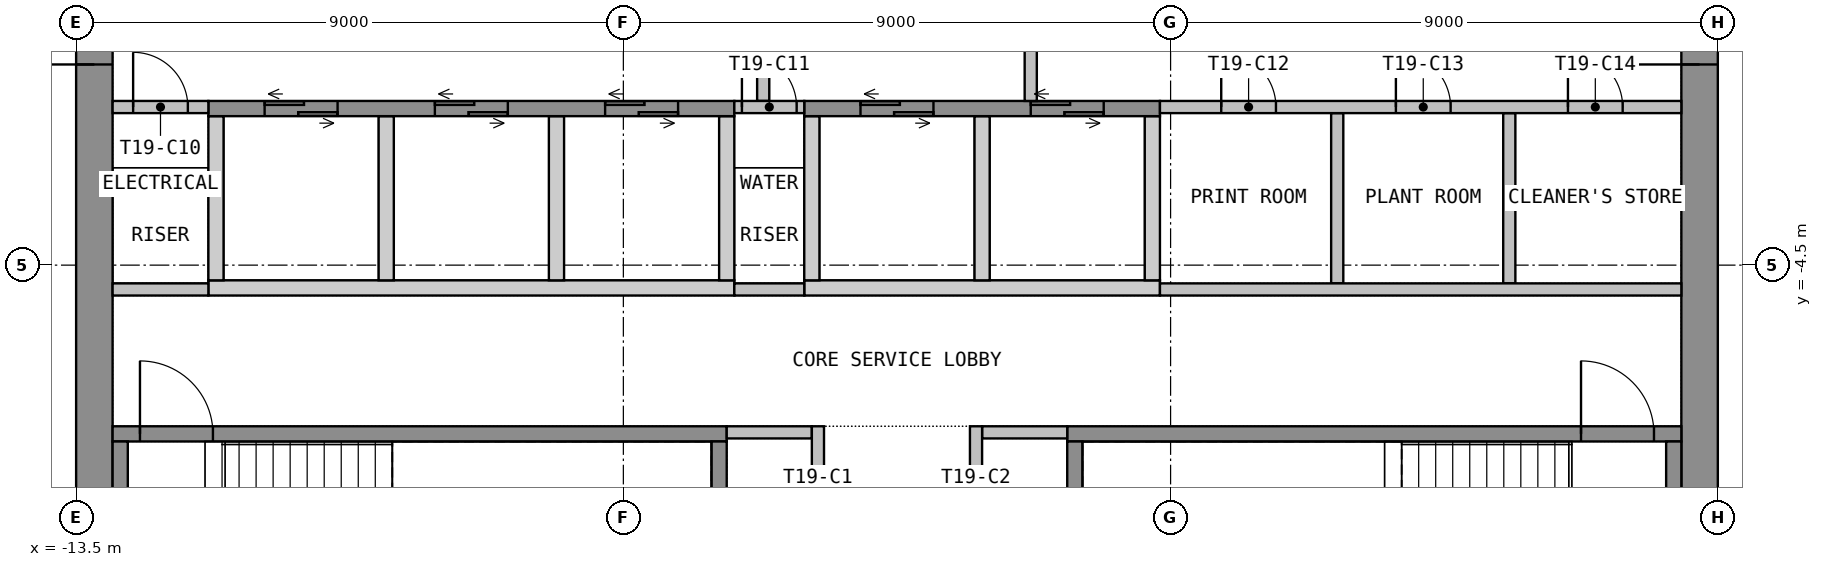
"""IFC4 building model, lengths in metres.
Left out: names, types, materials, properties, quantities, classifications, styles, units other than length and angle.
Written with IfcOpenShell. Run it as: python <this file> out.ifc"""

import sys

from ifc_helpers import new_model, si_unit, direction, frame, frame_2d, origin, place, context, subcontext, project, spatial, polyline, rectangle, outline, extrude, element, fill, save


model = new_model("IFC4")
c1 = context("Model", 3, precision=1e-05, world=origin(), true_north=direction((0.0, 1.0)))
c2 = subcontext(c1, "Body", "Model", "MODEL_VIEW")
j1 = project(units=[si_unit("LENGTHUNIT", "METRE"), si_unit("PLANEANGLEUNIT", "RADIAN")], contexts=[c1])
p1 = place(None, origin())
s1 = spatial("IfcSite", under=j1, at=p1, CompositionType="ELEMENT")
p2 = place(p1, origin())
s2 = spatial("IfcBuilding", under=s1, at=p2, CompositionType="ELEMENT")
p3 = place(p2, frame((0.0, 0.0, 258.6)))
s3 = spatial("IfcBuildingStorey", under=s2, at=p3, CompositionType="ELEMENT", Elevation=258.6)
p4 = place(p3, frame((-13.2, -10.65, 0.0), z_axis=(0.0, 0.0, 1.0), x_axis=(0.0, 1.0, 0.0)))
e1 = element("IfcWall", 1, at=p4, inside=s3, PredefinedType="SHEAR", context=c2, shape_type="SweptSolid", body=[
    extrude(rectangle(XDim=21.3, YDim=0.6, at=frame_2d((10.65, 0.0))), origin(), (0.0, 0.0, 1.0), 3.575),
])
p5 = place(p4, frame((9.45, 0.0, 0.0)))
e2 = element("IfcOpeningElement", 2, at=p5, cuts=e1, PredefinedType="OPENING", context=c2, shape_type="SweptSolid", body=[
    extrude(rectangle(XDim=2.4, YDim=2.1, at=frame_2d((1.2, 1.05))), frame((0.0, 0.31, 0.0), z_axis=(0.0, -1.0, 0.0), x_axis=(1.0, 0.0, 0.0)), (0.0, 0.0, 1.0), 0.62),
])
p6 = place(p3, frame((13.2, -10.65, 0.0), z_axis=(0.0, 0.0, 1.0), x_axis=(0.0, 1.0, 0.0)))
e3 = element("IfcWall", 3, at=p6, inside=s3, PredefinedType="SHEAR", context=c2, shape_type="SweptSolid", body=[
    extrude(rectangle(XDim=21.3, YDim=0.6, at=frame_2d((10.65, 0.0))), origin(), (0.0, 0.0, 1.0), 3.575),
])
p7 = place(p6, frame((9.45, 0.0, 0.0)))
e4 = element("IfcOpeningElement", 4, at=p7, cuts=e3, PredefinedType="OPENING", context=c2, shape_type="SweptSolid", body=[
    extrude(rectangle(XDim=2.4, YDim=2.1, at=frame_2d((1.2, 1.05))), frame((0.0, 0.31, 0.0), z_axis=(0.0, -1.0, 0.0), x_axis=(1.0, 0.0, 0.0)), (0.0, 0.0, 1.0), 0.62),
])
p8 = place(p3, origin())
e5 = element("IfcWall", 5, at=p8, inside=s3, PredefinedType="SHEAR", context=c2, shape_type="SweptSolid", body=[
    extrude(outline(polyline([(-11.325, -5.0), (-2.675, -5.0), (-2.675, -4.75), (-11.325, -4.75), (-11.325, -5.0)])), origin(), (0.0, 0.0, 1.0), 3.575),
])
p9 = place(p3, origin())
e6 = element("IfcWall", 6, at=p9, inside=s3, PredefinedType="SHEAR", context=c2, shape_type="SweptSolid", body=[
    extrude(outline(polyline([(-1.525, -5.0), (4.325, -5.0), (4.325, -4.75), (-1.525, -4.75), (-1.525, -5.0)])), origin(), (0.0, 0.0, 1.0), 3.575),
])
p10 = place(p3, origin())
e7 = element("IfcWall", 7, at=p10, inside=s3, PredefinedType="SHEAR", context=c2, shape_type="SweptSolid", body=[
    extrude(outline(polyline([(-11.325, -4.75), (-11.075, -4.75), (-11.075, -2.05), (-11.325, -2.05), (-11.325, -4.75)])), origin(), (0.0, 0.0, 1.0), 3.575),
])
p11 = place(p3, origin())
e8 = element("IfcWall", 8, at=p11, inside=s3, PredefinedType="SHEAR", context=c2, shape_type="SweptSolid", body=[
    extrude(outline(polyline([(-8.525, -4.75), (-8.275, -4.75), (-8.275, -2.05), (-8.525, -2.05), (-8.525, -4.75)])), origin(), (0.0, 0.0, 1.0), 3.575),
])
p12 = place(p3, origin())
e9 = element("IfcWall", 9, at=p12, inside=s3, PredefinedType="SHEAR", context=c2, shape_type="SweptSolid", body=[
    extrude(outline(polyline([(-5.725, -4.75), (-5.475, -4.75), (-5.475, -2.05), (-5.725, -2.05), (-5.725, -4.75)])), origin(), (0.0, 0.0, 1.0), 3.575),
])
p13 = place(p3, origin())
e10 = element("IfcWall", 10, at=p13, inside=s3, PredefinedType="SHEAR", context=c2, shape_type="SweptSolid", body=[
    extrude(outline(polyline([(-2.925, -4.75), (-2.675, -4.75), (-2.675, -2.05), (-2.925, -2.05), (-2.925, -4.75)])), origin(), (0.0, 0.0, 1.0), 3.575),
])
p14 = place(p3, origin())
e11 = element("IfcWall", 11, at=p14, inside=s3, PredefinedType="SHEAR", context=c2, shape_type="SweptSolid", body=[
    extrude(outline(polyline([(-1.525, -4.75), (-1.275, -4.75), (-1.275, -2.05), (-1.525, -2.05), (-1.525, -4.75)])), origin(), (0.0, 0.0, 1.0), 3.575),
])
p15 = place(p3, origin())
e12 = element("IfcWall", 12, at=p15, inside=s3, PredefinedType="SHEAR", context=c2, shape_type="SweptSolid", body=[
    extrude(outline(polyline([(1.275, -4.75), (1.525, -4.75), (1.525, -2.05), (1.275, -2.05), (1.275, -4.75)])), origin(), (0.0, 0.0, 1.0), 3.575),
])
p16 = place(p3, origin())
e13 = element("IfcWall", 13, at=p16, inside=s3, PredefinedType="SHEAR", context=c2, shape_type="SweptSolid", body=[
    extrude(outline(polyline([(4.075, -4.75), (4.325, -4.75), (4.325, -2.05), (4.075, -2.05), (4.075, -4.75)])), origin(), (0.0, 0.0, 1.0), 3.575),
])
p17 = place(p3, frame((-11.325, -1.925, 0.0), z_axis=(0.0, 0.0, 1.0), x_axis=(1.0, 0.0, 0.0)))
e14 = element("IfcWall", 14, at=p17, inside=s3, PredefinedType="SHEAR", context=c2, shape_type="SweptSolid", body=[
    extrude(rectangle(XDim=8.65, YDim=0.25, at=frame_2d((4.325, 0.0))), origin(), (0.0, 0.0, 1.0), 3.575),
])
p18 = place(p17, frame((0.925, 0.0, 0.0)))
e15 = element("IfcOpeningElement", 15, at=p18, cuts=e14, PredefinedType="OPENING", context=c2, shape_type="SweptSolid", body=[
    extrude(rectangle(XDim=1.2, YDim=2.1, at=frame_2d((0.6, 1.05))), frame((0.0, 0.135, 0.0), z_axis=(0.0, -1.0, 0.0), x_axis=(1.0, 0.0, 0.0)), (0.0, 0.0, 1.0), 0.27),
])
p19 = place(p17, frame((3.725, 0.0, 0.0)))
e16 = element("IfcOpeningElement", 16, at=p19, cuts=e14, PredefinedType="OPENING", context=c2, shape_type="SweptSolid", body=[
    extrude(rectangle(XDim=1.2, YDim=2.1, at=frame_2d((0.6, 1.05))), frame((0.0, 0.135, 0.0), z_axis=(0.0, -1.0, 0.0), x_axis=(1.0, 0.0, 0.0)), (0.0, 0.0, 1.0), 0.27),
])
p20 = place(p17, frame((6.525, 0.0, 0.0)))
e17 = element("IfcOpeningElement", 17, at=p20, cuts=e14, PredefinedType="OPENING", context=c2, shape_type="SweptSolid", body=[
    extrude(rectangle(XDim=1.2, YDim=2.1, at=frame_2d((0.6, 1.05))), frame((0.0, 0.135, 0.0), z_axis=(0.0, -1.0, 0.0), x_axis=(1.0, 0.0, 0.0)), (0.0, 0.0, 1.0), 0.27),
])
p21 = place(p3, frame((-1.525, -1.925, 0.0), z_axis=(0.0, 0.0, 1.0), x_axis=(1.0, 0.0, 0.0)))
e18 = element("IfcWall", 18, at=p21, inside=s3, PredefinedType="SHEAR", context=c2, shape_type="SweptSolid", body=[
    extrude(rectangle(XDim=5.85, YDim=0.25, at=frame_2d((2.925, 0.0))), origin(), (0.0, 0.0, 1.0), 3.575),
])
p22 = place(p21, frame((0.925, 0.0, 0.0)))
e19 = element("IfcOpeningElement", 19, at=p22, cuts=e18, PredefinedType="OPENING", context=c2, shape_type="SweptSolid", body=[
    extrude(rectangle(XDim=1.2, YDim=2.1, at=frame_2d((0.6, 1.05))), frame((0.0, 0.135, 0.0), z_axis=(0.0, -1.0, 0.0), x_axis=(1.0, 0.0, 0.0)), (0.0, 0.0, 1.0), 0.27),
])
p23 = place(p21, frame((3.725, 0.0, 0.0)))
e20 = element("IfcOpeningElement", 20, at=p23, cuts=e18, PredefinedType="OPENING", context=c2, shape_type="SweptSolid", body=[
    extrude(rectangle(XDim=1.2, YDim=2.1, at=frame_2d((0.6, 1.05))), frame((0.0, 0.135, 0.0), z_axis=(0.0, -1.0, 0.0), x_axis=(1.0, 0.0, 0.0)), (0.0, 0.0, 1.0), 0.27),
])
p24 = place(p3, frame((-2.2, -1.8, 0.0), z_axis=(0.0, 0.0, 1.0), x_axis=(0.0, 1.0, 0.0)))
e21 = element("IfcWall", 21, at=p24, inside=s3, PredefinedType="PARTITIONING", context=c2, shape_type="SweptSolid", body=[
    extrude(rectangle(XDim=3.6, YDim=0.2, at=frame_2d((1.8, 0.0))), origin(), (0.0, 0.0, 1.0), 3.575),
])
p25 = place(p24, frame((1.2, 0.0, 0.0)))
e22 = element("IfcOpeningElement", 22, at=p25, cuts=e21, PredefinedType="OPENING", context=c2, shape_type="SweptSolid", body=[
    extrude(rectangle(XDim=1.2, YDim=2.1, at=frame_2d((0.6, 1.05))), frame((0.0, 0.11, 0.0), z_axis=(0.0, -1.0, 0.0), x_axis=(1.0, 0.0, 0.0)), (0.0, 0.0, 1.0), 0.22),
])
p26 = place(p3, frame((2.2, -1.8, 0.0), z_axis=(0.0, 0.0, 1.0), x_axis=(0.0, 1.0, 0.0)))
e23 = element("IfcWall", 23, at=p26, inside=s3, PredefinedType="PARTITIONING", context=c2, shape_type="SweptSolid", body=[
    extrude(rectangle(XDim=3.6, YDim=0.2, at=frame_2d((1.8, 0.0))), origin(), (0.0, 0.0, 1.0), 3.575),
])
p27 = place(p26, frame((1.2, 0.0, 0.0)))
e24 = element("IfcOpeningElement", 24, at=p27, cuts=e23, PredefinedType="OPENING", context=c2, shape_type="SweptSolid", body=[
    extrude(rectangle(XDim=1.2, YDim=2.1, at=frame_2d((0.6, 1.05))), frame((0.0, 0.11, 0.0), z_axis=(0.0, -1.0, 0.0), x_axis=(1.0, 0.0, 0.0)), (0.0, 0.0, 1.0), 0.22),
])
p28 = place(p3, frame((-12.9, -7.275, 0.0), z_axis=(0.0, 0.0, 1.0), x_axis=(1.0, 0.0, 0.0)))
e25 = element("IfcWall", 25, at=p28, inside=s3, PredefinedType="SHEAR", context=c2, shape_type="SweptSolid", body=[
    extrude(rectangle(XDim=10.1, YDim=0.25, at=frame_2d((5.05, 0.0))), origin(), (0.0, 0.0, 1.0), 3.575),
])
p29 = place(p28, frame((0.45, 0.0, 0.0)))
e26 = element("IfcOpeningElement", 26, at=p29, cuts=e25, PredefinedType="OPENING", context=c2, shape_type="SweptSolid", body=[
    extrude(rectangle(XDim=1.2, YDim=2.1, at=frame_2d((0.6, 1.05))), frame((0.0, 0.135, 0.0), z_axis=(0.0, -1.0, 0.0), x_axis=(1.0, 0.0, 0.0)), (0.0, 0.0, 1.0), 0.27),
])
for number, where, z_axis, x_axis in (
    (27, (-12.775, -10.65, 0.0), (0.0, 0.0, 1.0), (0.0, 1.0, 0.0)),
    (28, (-2.925, -10.65, 0.0), (0.0, 0.0, 1.0), (0.0, 1.0, 0.0)),
):
    element("IfcWall", number, at=place(p3, frame(where, z_axis=z_axis, x_axis=x_axis)), inside=s3, PredefinedType="SHEAR", context=c2, shape_type="SweptSolid", body=[
        extrude(rectangle(XDim=3.25, YDim=0.25, at=frame_2d((1.625, 0.0))), origin(), (0.0, 0.0, 1.0), 3.575),
    ])
p30 = place(p3, frame((2.8, -7.275, 0.0), z_axis=(0.0, 0.0, 1.0), x_axis=(1.0, 0.0, 0.0)))
e29 = element("IfcWall", 29, at=p30, inside=s3, PredefinedType="SHEAR", context=c2, shape_type="SweptSolid", body=[
    extrude(rectangle(XDim=10.1, YDim=0.25, at=frame_2d((5.05, 0.0))), origin(), (0.0, 0.0, 1.0), 3.575),
])
p31 = place(p30, frame((8.45, 0.0, 0.0)))
e30 = element("IfcOpeningElement", 30, at=p31, cuts=e29, PredefinedType="OPENING", context=c2, shape_type="SweptSolid", body=[
    extrude(rectangle(XDim=1.2, YDim=2.1, at=frame_2d((0.6, 1.05))), frame((0.0, 0.135, 0.0), z_axis=(0.0, -1.0, 0.0), x_axis=(1.0, 0.0, 0.0)), (0.0, 0.0, 1.0), 0.27),
])
for number, where, z_axis, x_axis in (
    (31, (2.925, -10.65, 0.0), (0.0, 0.0, 1.0), (0.0, 1.0, 0.0)),
    (32, (12.775, -10.65, 0.0), (0.0, 0.0, 1.0), (0.0, 1.0, 0.0)),
):
    element("IfcWall", number, at=place(p3, frame(where, z_axis=z_axis, x_axis=x_axis)), inside=s3, PredefinedType="SHEAR", context=c2, shape_type="SweptSolid", body=[
        extrude(rectangle(XDim=3.25, YDim=0.25, at=frame_2d((1.625, 0.0))), origin(), (0.0, 0.0, 1.0), 3.575),
    ])
for number, where, z_axis, x_axis in (
    (33, (-2.8, -7.25, 0.0), (0.0, 0.0, 1.0), (1.0, 0.0, 0.0)),
    (34, (1.4, -7.25, 0.0), (0.0, 0.0, 1.0), (1.0, 0.0, 0.0)),
):
    element("IfcWall", number, at=place(p3, frame(where, z_axis=z_axis, x_axis=x_axis)), inside=s3, PredefinedType="PARTITIONING", context=c2, shape_type="SweptSolid", body=[
        extrude(rectangle(XDim=1.4, YDim=0.2, at=frame_2d((0.7, 0.0))), origin(), (0.0, 0.0, 1.0), 3.575),
    ])
p32 = place(p3, frame((-1.3, -10.65, 0.0), z_axis=(0.0, 0.0, 1.0), x_axis=(0.0, 1.0, 0.0)))
e35 = element("IfcWall", 35, at=p32, inside=s3, PredefinedType="PARTITIONING", context=c2, shape_type="SweptSolid", body=[
    extrude(rectangle(XDim=3.5, YDim=0.2, at=frame_2d((1.75, 0.0))), origin(), (0.0, 0.0, 1.0), 3.575),
])
p33 = place(p32, frame((1.2, 0.0, 0.0)))
e36 = element("IfcOpeningElement", 36, at=p33, cuts=e35, PredefinedType="OPENING", context=c2, shape_type="SweptSolid", body=[
    extrude(rectangle(XDim=0.9, YDim=2.1, at=frame_2d((0.45, 1.05))), frame((0.0, 0.11, 0.0), z_axis=(0.0, -1.0, 0.0), x_axis=(1.0, 0.0, 0.0)), (0.0, 0.0, 1.0), 0.22),
])
p34 = place(p3, frame((1.3, -10.65, 0.0), z_axis=(0.0, 0.0, 1.0), x_axis=(0.0, 1.0, 0.0)))
e37 = element("IfcWall", 37, at=p34, inside=s3, PredefinedType="PARTITIONING", context=c2, shape_type="SweptSolid", body=[
    extrude(rectangle(XDim=3.5, YDim=0.2, at=frame_2d((1.75, 0.0))), origin(), (0.0, 0.0, 1.0), 3.575),
])
p35 = place(p34, frame((1.2, 0.0, 0.0)))
e38 = element("IfcOpeningElement", 38, at=p35, cuts=e37, PredefinedType="OPENING", context=c2, shape_type="SweptSolid", body=[
    extrude(rectangle(XDim=0.9, YDim=2.1, at=frame_2d((0.45, 1.05))), frame((0.0, 0.11, 0.0), z_axis=(0.0, -1.0, 0.0), x_axis=(1.0, 0.0, 0.0)), (0.0, 0.0, 1.0), 0.22),
])
p36 = place(p3, frame((-12.9, -1.9, 0.0), z_axis=(0.0, 0.0, 1.0), x_axis=(1.0, 0.0, 0.0)))
e39 = element("IfcWall", 39, at=p36, inside=s3, PredefinedType="PARTITIONING", context=c2, shape_type="SweptSolid", body=[
    extrude(rectangle(XDim=1.575, YDim=0.2, at=frame_2d((0.788, 0.0))), origin(), (0.0, 0.0, 1.0), 3.575),
])
p37 = place(p36, frame((0.337, 0.0, 0.0)))
e40 = element("IfcOpeningElement", 40, at=p37, cuts=e39, PredefinedType="OPENING", context=c2, shape_type="SweptSolid", body=[
    extrude(rectangle(XDim=0.9, YDim=2.1, at=frame_2d((0.45, 1.05))), frame((0.0, 0.11, 0.0), z_axis=(0.0, -1.0, 0.0), x_axis=(1.0, 0.0, 0.0)), (0.0, 0.0, 1.0), 0.22),
])
p38 = place(p3, frame((-12.9, -4.9, 0.0), z_axis=(0.0, 0.0, 1.0), x_axis=(1.0, 0.0, 0.0)))
e41 = element("IfcWall", 41, at=p38, inside=s3, PredefinedType="PARTITIONING", context=c2, shape_type="SweptSolid", body=[
    extrude(rectangle(XDim=1.575, YDim=0.2, at=frame_2d((0.788, 0.0))), origin(), (0.0, 0.0, 1.0), 3.575),
])
p39 = place(p3, frame((-2.675, -1.9, 0.0), z_axis=(0.0, 0.0, 1.0), x_axis=(1.0, 0.0, 0.0)))
e42 = element("IfcWall", 42, at=p39, inside=s3, PredefinedType="PARTITIONING", context=c2, shape_type="SweptSolid", body=[
    extrude(rectangle(XDim=1.15, YDim=0.2, at=frame_2d((0.575, 0.0))), origin(), (0.0, 0.0, 1.0), 3.575),
])
p40 = place(p39, frame((0.125, 0.0, 0.0)))
e43 = element("IfcOpeningElement", 43, at=p40, cuts=e42, PredefinedType="OPENING", context=c2, shape_type="SweptSolid", body=[
    extrude(rectangle(XDim=0.9, YDim=2.1, at=frame_2d((0.45, 1.05))), frame((0.0, 0.11, 0.0), z_axis=(0.0, -1.0, 0.0), x_axis=(1.0, 0.0, 0.0)), (0.0, 0.0, 1.0), 0.22),
])
p41 = place(p3, frame((-2.675, -4.9, 0.0), z_axis=(0.0, 0.0, 1.0), x_axis=(1.0, 0.0, 0.0)))
e44 = element("IfcWall", 44, at=p41, inside=s3, PredefinedType="PARTITIONING", context=c2, shape_type="SweptSolid", body=[
    extrude(rectangle(XDim=1.15, YDim=0.2, at=frame_2d((0.575, 0.0))), origin(), (0.0, 0.0, 1.0), 3.575),
])
for number, where, z_axis, x_axis in (
    (45, (7.24, -4.8, 0.0), (0.0, 0.0, 1.0), (0.0, 1.0, 0.0)),
    (46, (10.07, -4.8, 0.0), (0.0, 0.0, 1.0), (0.0, 1.0, 0.0)),
):
    element("IfcWall", number, at=place(p3, frame(where, z_axis=z_axis, x_axis=x_axis)), inside=s3, PredefinedType="PARTITIONING", context=c2, shape_type="SweptSolid", body=[
        extrude(rectangle(XDim=2.8, YDim=0.2, at=frame_2d((1.4, 0.0))), origin(), (0.0, 0.0, 1.0), 3.575),
    ])
p42 = place(p3, frame((4.325, -1.9, 0.0), z_axis=(0.0, 0.0, 1.0), x_axis=(1.0, 0.0, 0.0)))
e47 = element("IfcWall", 47, at=p42, inside=s3, PredefinedType="PARTITIONING", context=c2, shape_type="SweptSolid", body=[
    extrude(rectangle(XDim=8.575, YDim=0.2, at=frame_2d((4.288, 0.0))), origin(), (0.0, 0.0, 1.0), 3.575),
])
p43 = place(p42, frame((1.008, 0.0, 0.0)))
e48 = element("IfcOpeningElement", 48, at=p43, cuts=e47, PredefinedType="OPENING", context=c2, shape_type="SweptSolid", body=[
    extrude(rectangle(XDim=0.9, YDim=2.1, at=frame_2d((0.45, 1.05))), frame((0.0, 0.11, 0.0), z_axis=(0.0, -1.0, 0.0), x_axis=(1.0, 0.0, 0.0)), (0.0, 0.0, 1.0), 0.22),
])
p44 = place(p42, frame((3.88, 0.0, 0.0)))
e49 = element("IfcOpeningElement", 49, at=p44, cuts=e47, PredefinedType="OPENING", context=c2, shape_type="SweptSolid", body=[
    extrude(rectangle(XDim=0.9, YDim=2.1, at=frame_2d((0.45, 1.05))), frame((0.0, 0.11, 0.0), z_axis=(0.0, -1.0, 0.0), x_axis=(1.0, 0.0, 0.0)), (0.0, 0.0, 1.0), 0.22),
])
p45 = place(p42, frame((6.71, 0.0, 0.0)))
e50 = element("IfcOpeningElement", 50, at=p45, cuts=e47, PredefinedType="OPENING", context=c2, shape_type="SweptSolid", body=[
    extrude(rectangle(XDim=0.9, YDim=2.1, at=frame_2d((0.45, 1.05))), frame((0.0, 0.11, 0.0), z_axis=(0.0, -1.0, 0.0), x_axis=(1.0, 0.0, 0.0)), (0.0, 0.0, 1.0), 0.22),
])
p46 = place(p3, frame((4.325, -4.9, 0.0), z_axis=(0.0, 0.0, 1.0), x_axis=(1.0, 0.0, 0.0)))
e51 = element("IfcWall", 51, at=p46, inside=s3, PredefinedType="PARTITIONING", context=c2, shape_type="SweptSolid", body=[
    extrude(rectangle(XDim=8.575, YDim=0.2, at=frame_2d((4.288, 0.0))), origin(), (0.0, 0.0, 1.0), 3.575),
])
p47 = place(p5, origin())
e52 = element("IfcDoor", 52, at=p47, inside=s3, OperationType="DOUBLE_DOOR_DOUBLE_SWING", PredefinedType="DOOR", context=c2, shape_type="SweptSolid", body=[
    extrude(rectangle(XDim=2.4, YDim=2.1, at=frame_2d((1.2, 1.05))), frame((0.0, 0.025, 0.0), z_axis=(0.0, -1.0, 0.0), x_axis=(1.0, 0.0, 0.0)), (0.0, 0.0, 1.0), 0.05),
])
fill(e2, e52)
p48 = place(p7, origin())
e53 = element("IfcDoor", 53, at=p48, inside=s3, OperationType="DOUBLE_DOOR_DOUBLE_SWING", PredefinedType="DOOR", context=c2, shape_type="SweptSolid", body=[
    extrude(rectangle(XDim=2.4, YDim=2.1, at=frame_2d((1.2, 1.05))), frame((0.0, 0.025, 0.0), z_axis=(0.0, -1.0, 0.0), x_axis=(1.0, 0.0, 0.0)), (0.0, 0.0, 1.0), 0.05),
])
fill(e4, e53)
p49 = place(p18, origin())
e54 = element("IfcDoor", 54, at=p49, inside=s3, OperationType="DOUBLE_DOOR_SLIDING", PredefinedType="DOOR", context=c2, shape_type="SweptSolid", body=[
    extrude(rectangle(XDim=1.2, YDim=2.1, at=frame_2d((0.6, 1.05))), frame((0.0, 0.025, 0.0), z_axis=(0.0, -1.0, 0.0), x_axis=(1.0, 0.0, 0.0)), (0.0, 0.0, 1.0), 0.05),
])
fill(e15, e54)
p50 = place(p19, origin())
e55 = element("IfcDoor", 55, at=p50, inside=s3, OperationType="DOUBLE_DOOR_SLIDING", PredefinedType="DOOR", context=c2, shape_type="SweptSolid", body=[
    extrude(rectangle(XDim=1.2, YDim=2.1, at=frame_2d((0.6, 1.05))), frame((0.0, 0.025, 0.0), z_axis=(0.0, -1.0, 0.0), x_axis=(1.0, 0.0, 0.0)), (0.0, 0.0, 1.0), 0.05),
])
fill(e16, e55)
p51 = place(p20, origin())
e56 = element("IfcDoor", 56, at=p51, inside=s3, OperationType="DOUBLE_DOOR_SLIDING", PredefinedType="DOOR", context=c2, shape_type="SweptSolid", body=[
    extrude(rectangle(XDim=1.2, YDim=2.1, at=frame_2d((0.6, 1.05))), frame((0.0, 0.025, 0.0), z_axis=(0.0, -1.0, 0.0), x_axis=(1.0, 0.0, 0.0)), (0.0, 0.0, 1.0), 0.05),
])
fill(e17, e56)
p52 = place(p22, origin())
e57 = element("IfcDoor", 57, at=p52, inside=s3, OperationType="DOUBLE_DOOR_SLIDING", PredefinedType="DOOR", context=c2, shape_type="SweptSolid", body=[
    extrude(rectangle(XDim=1.2, YDim=2.1, at=frame_2d((0.6, 1.05))), frame((0.0, 0.025, 0.0), z_axis=(0.0, -1.0, 0.0), x_axis=(1.0, 0.0, 0.0)), (0.0, 0.0, 1.0), 0.05),
])
fill(e19, e57)
p53 = place(p23, origin())
e58 = element("IfcDoor", 58, at=p53, inside=s3, OperationType="DOUBLE_DOOR_SLIDING", PredefinedType="DOOR", context=c2, shape_type="SweptSolid", body=[
    extrude(rectangle(XDim=1.2, YDim=2.1, at=frame_2d((0.6, 1.05))), frame((0.0, 0.025, 0.0), z_axis=(0.0, -1.0, 0.0), x_axis=(1.0, 0.0, 0.0)), (0.0, 0.0, 1.0), 0.05),
])
fill(e20, e58)
p54 = place(p29, origin())
e59 = element("IfcDoor", 59, at=p54, inside=s3, OperationType="SINGLE_SWING_LEFT", PredefinedType="DOOR", context=c2, shape_type="SweptSolid", body=[
    extrude(rectangle(XDim=1.2, YDim=2.1, at=frame_2d((0.6, 1.05))), frame((0.0, 0.025, 0.0), z_axis=(0.0, -1.0, 0.0), x_axis=(1.0, 0.0, 0.0)), (0.0, 0.0, 1.0), 0.05),
])
fill(e26, e59)
p55 = place(p31, origin())
e60 = element("IfcDoor", 60, at=p55, inside=s3, OperationType="SINGLE_SWING_LEFT", PredefinedType="DOOR", context=c2, shape_type="SweptSolid", body=[
    extrude(rectangle(XDim=1.2, YDim=2.1, at=frame_2d((0.6, 1.05))), frame((0.0, 0.025, 0.0), z_axis=(0.0, -1.0, 0.0), x_axis=(1.0, 0.0, 0.0)), (0.0, 0.0, 1.0), 0.05),
])
fill(e30, e60)
p56 = place(p37, origin())
e61 = element("IfcDoor", 61, at=p56, inside=s3, OperationType="SINGLE_SWING_LEFT", PredefinedType="DOOR", context=c2, shape_type="SweptSolid", body=[
    extrude(rectangle(XDim=0.9, YDim=2.1, at=frame_2d((0.45, 1.05))), frame((0.0, 0.025, 0.0), z_axis=(0.0, -1.0, 0.0), x_axis=(1.0, 0.0, 0.0)), (0.0, 0.0, 1.0), 0.05),
])
fill(e40, e61)
p57 = place(p40, origin())
e62 = element("IfcDoor", 62, at=p57, inside=s3, OperationType="SINGLE_SWING_LEFT", PredefinedType="DOOR", context=c2, shape_type="SweptSolid", body=[
    extrude(rectangle(XDim=0.9, YDim=2.1, at=frame_2d((0.45, 1.05))), frame((0.0, 0.025, 0.0), z_axis=(0.0, -1.0, 0.0), x_axis=(1.0, 0.0, 0.0)), (0.0, 0.0, 1.0), 0.05),
])
fill(e43, e62)
p58 = place(p43, origin())
e63 = element("IfcDoor", 63, at=p58, inside=s3, OperationType="SINGLE_SWING_LEFT", PredefinedType="DOOR", context=c2, shape_type="SweptSolid", body=[
    extrude(rectangle(XDim=0.9, YDim=2.1, at=frame_2d((0.45, 1.05))), frame((0.0, 0.025, 0.0), z_axis=(0.0, -1.0, 0.0), x_axis=(1.0, 0.0, 0.0)), (0.0, 0.0, 1.0), 0.05),
])
fill(e48, e63)
p59 = place(p44, origin())
e64 = element("IfcDoor", 64, at=p59, inside=s3, OperationType="SINGLE_SWING_LEFT", PredefinedType="DOOR", context=c2, shape_type="SweptSolid", body=[
    extrude(rectangle(XDim=0.9, YDim=2.1, at=frame_2d((0.45, 1.05))), frame((0.0, 0.025, 0.0), z_axis=(0.0, -1.0, 0.0), x_axis=(1.0, 0.0, 0.0)), (0.0, 0.0, 1.0), 0.05),
])
fill(e49, e64)
p60 = place(p45, origin())
e65 = element("IfcDoor", 65, at=p60, inside=s3, OperationType="SINGLE_SWING_LEFT", PredefinedType="DOOR", context=c2, shape_type="SweptSolid", body=[
    extrude(rectangle(XDim=0.9, YDim=2.1, at=frame_2d((0.45, 1.05))), frame((0.0, 0.025, 0.0), z_axis=(0.0, -1.0, 0.0), x_axis=(1.0, 0.0, 0.0)), (0.0, 0.0, 1.0), 0.05),
])
fill(e50, e65)
save(model, sys.argv[1])
